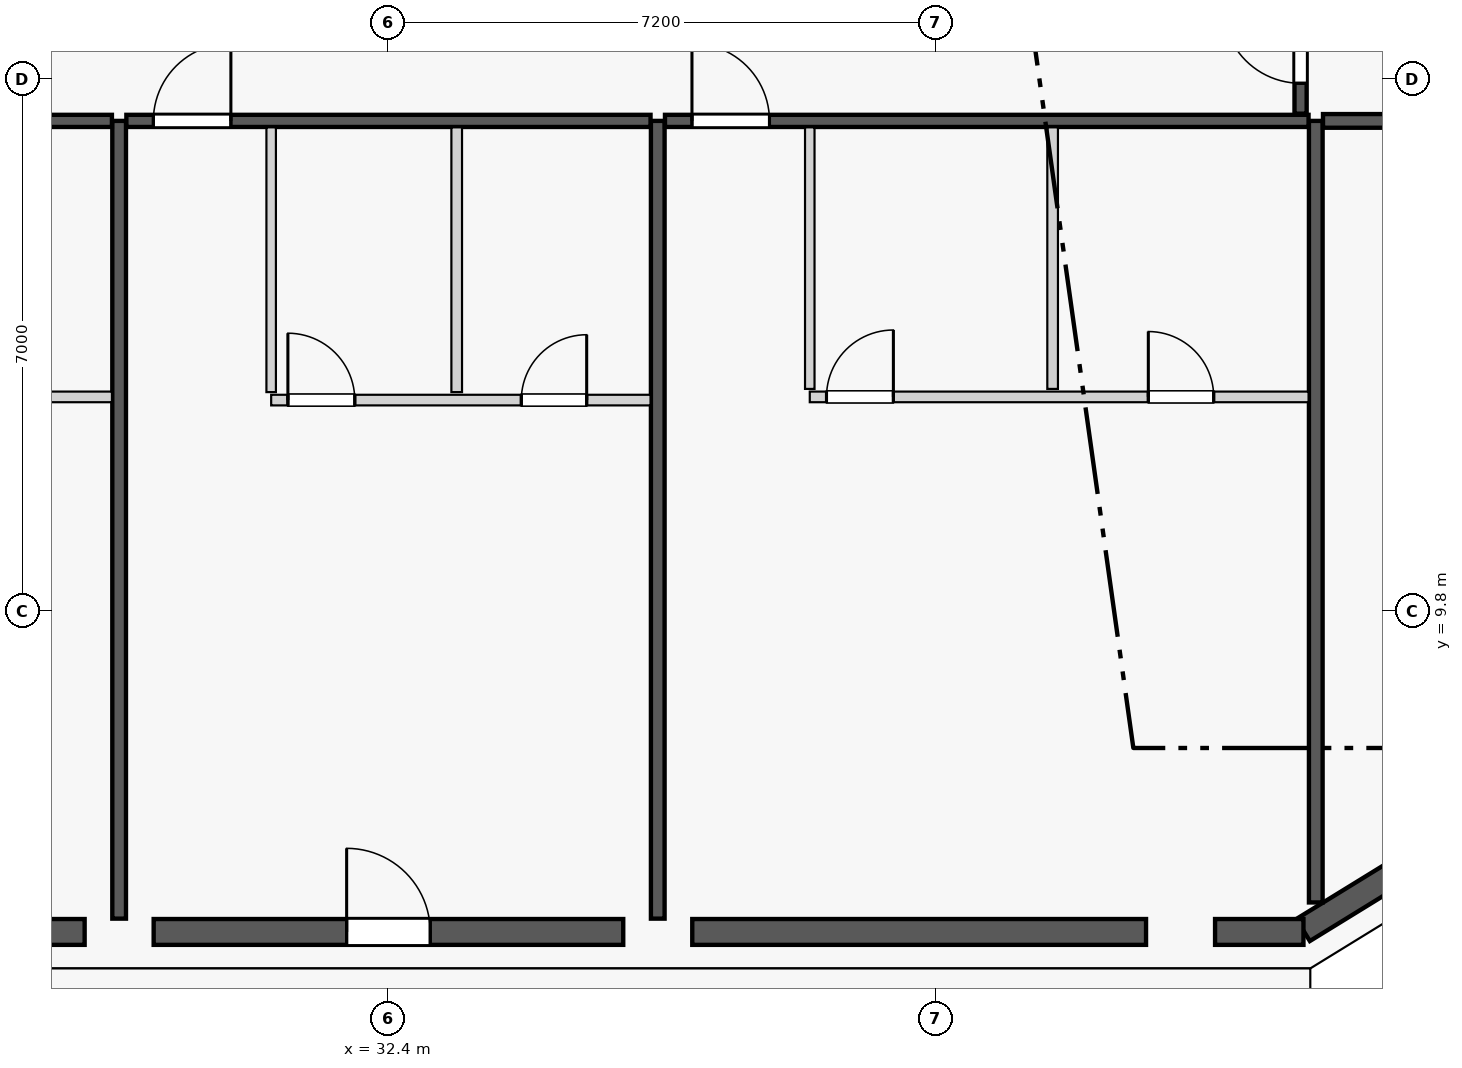
"""IFC4 building model, lengths in metres.
Left out: names, types, materials, properties, quantities, classifications, styles, units other than length and angle.
Written with IfcOpenShell. Run it as: python <this file> out.ifc"""

import sys

from ifc_helpers import new_model, si_unit, direction, frame, frame_2d, origin, origin_2d, place, context, subcontext, project, spatial, rectangle, extrude, element, fill, save


model = new_model("IFC4")
c1 = context("Model", 3, precision=1e-05, world=origin(), true_north=direction((0.0, 1.0)))
c2 = subcontext(c1, "Body", "Model", "MODEL_VIEW")
j1 = project(units=[si_unit("LENGTHUNIT", "METRE"), si_unit("PLANEANGLEUNIT", "RADIAN")], contexts=[c1])
p1 = place(None, origin())
s1 = spatial("IfcSite", under=j1, at=p1, CompositionType="ELEMENT")
p2 = place(p1, origin())
s2 = spatial("IfcBuilding", under=s1, at=p2, CompositionType="ELEMENT")
p3 = place(p2, frame((0.0, 0.0, 186.1)))
s3 = spatial("IfcBuildingStorey", under=s2, at=p3, CompositionType="ELEMENT", Elevation=186.1)
for number, where, z_axis, x_axis in (
    (1, (28.857, 5.642, 0.0), (0.0, 0.0, 1.0), (1.0, 0.0, 0.0)),
    (2, (35.943, 5.642, 0.0), (0.0, 0.0, 1.0), (1.0, 0.0, 0.0)),
    (3, (42.821, 5.589, 0.0), (0.0, 0.0, 1.0), (1.0, 0.0, 0.0)),
):
    element("IfcColumn", number, at=place(p3, frame(where, z_axis=z_axis, x_axis=x_axis)), inside=s3, PredefinedType="COLUMN", context=c2, shape_type="SweptSolid", body=[
        extrude(rectangle(XDim=0.9, YDim=0.9, at=origin_2d()), origin(), (0.0, 0.0, 1.0), 3.55),
    ])
p4 = place(p3, frame((44.658, 6.654, 0.0), z_axis=(0.0, 0.0, 1.0), x_axis=(0.865230187018, 0.501374833306, 0.0)))
e4 = element("IfcColumn", 4, at=p4, inside=s3, PredefinedType="PILASTER", context=c2, shape_type="SweptSolid", body=[
    extrude(rectangle(XDim=0.5, YDim=0.35, at=origin_2d()), origin(), (0.0, 0.0, 1.0), 3.55),
])
p5 = place(p3, frame((44.433, 5.605, 0.0), z_axis=(0.0, 0.0, 1.0), x_axis=(0.851778214877, 0.523902541185, 0.0)))
e5 = element("IfcWall", 5, at=p5, inside=s3, PredefinedType="STANDARD", context=c2, shape_type="SweptSolid", body=[
    extrude(rectangle(XDim=1.678, YDim=0.34, at=frame_2d((0.839, 0.0))), origin(), (0.0, 0.0, 1.0), 3.35),
])
p6 = place(p3, frame((22.433, 5.58, 0.0), z_axis=(0.0, 0.0, 1.0), x_axis=(1.0, 0.0, 0.0)))
e6 = element("IfcWall", 6, at=p6, inside=s3, PredefinedType="STANDARD", context=c2, shape_type="SweptSolid", body=[
    extrude(rectangle(XDim=5.97, YDim=0.34, at=frame_2d((2.985, 0.0))), origin(), (0.0, 0.0, 1.0), 2.883),
])
p7 = place(p6, frame((2.435, 0.0, 0.75)))
e7 = element("IfcOpeningElement", 7, at=p7, cuts=e6, PredefinedType="OPENING", context=c2, shape_type="SweptSolid", body=[
    extrude(rectangle(XDim=1.1, YDim=1.983, at=frame_2d((0.55, 0.991))), frame((0.0, 0.18, 0.0), z_axis=(0.0, -1.0, 0.0), x_axis=(1.0, 0.0, 0.0)), (0.0, 0.0, 1.0), 0.36),
])
p8 = place(p3, frame((29.311, 5.58, 0.0), z_axis=(0.0, 0.0, 1.0), x_axis=(1.0, 0.0, 0.0)))
e8 = element("IfcWall", 8, at=p8, inside=s3, PredefinedType="STANDARD", context=c2, shape_type="SweptSolid", body=[
    extrude(rectangle(XDim=6.178, YDim=0.34, at=frame_2d((3.089, 0.0))), origin(), (0.0, 0.0, 1.0), 2.883),
])
p9 = place(p8, frame((2.539, 0.0, 0.0)))
e9 = element("IfcOpeningElement", 9, at=p9, cuts=e8, PredefinedType="OPENING", context=c2, shape_type="SweptSolid", body=[
    extrude(rectangle(XDim=1.1, YDim=2.25, at=frame_2d((0.55, 1.125))), frame((0.0, 0.18, 0.0), z_axis=(0.0, -1.0, 0.0), x_axis=(1.0, 0.0, 0.0)), (0.0, 0.0, 1.0), 0.36),
])
p10 = place(p3, frame((36.397, 5.58, 0.0), z_axis=(0.0, 0.0, 1.0), x_axis=(1.0, 0.0, 0.0)))
e10 = element("IfcWall", 10, at=p10, inside=s3, PredefinedType="STANDARD", context=c2, shape_type="SweptSolid", body=[
    extrude(rectangle(XDim=5.97, YDim=0.34, at=frame_2d((2.985, 0.0))), origin(), (0.0, 0.0, 1.0), 2.883),
])
p11 = place(p10, frame((2.435, 0.0, 0.75)))
e11 = element("IfcOpeningElement", 11, at=p11, cuts=e10, PredefinedType="OPENING", context=c2, shape_type="SweptSolid", body=[
    extrude(rectangle(XDim=1.1, YDim=1.983, at=frame_2d((0.55, 0.991))), frame((0.0, 0.18, 0.0), z_axis=(0.0, -1.0, 0.0), x_axis=(1.0, 0.0, 0.0)), (0.0, 0.0, 1.0), 0.36),
])
p12 = place(p3, frame((43.275, 5.58, 0.0), z_axis=(0.0, 0.0, 1.0), x_axis=(1.0, 0.0, 0.0)))
e12 = element("IfcWall", 12, at=p12, inside=s3, PredefinedType="STANDARD", context=c2, shape_type="SweptSolid", body=[
    extrude(rectangle(XDim=1.163, YDim=0.34, at=frame_2d((0.582, 0.0))), origin(), (0.0, 0.0, 1.0), 3.35),
])
for number, where, z_axis, x_axis in (
    (13, (28.857, 5.755, 0.0), (0.0, 0.0, 1.0), (0.0, 1.0, 0.0)),
    (14, (35.943, 5.755, 0.0), (0.0, 0.0, 1.0), (0.0, 1.0, 0.0)),
):
    element("IfcWall", number, at=place(p3, frame(where, z_axis=z_axis, x_axis=x_axis)), inside=s3, PredefinedType="PARTITIONING", context=c2, shape_type="SweptSolid", body=[
        extrude(rectangle(XDim=10.495, YDim=0.18, at=frame_2d((5.248, 0.0))), origin(), (0.0, 0.0, 1.0), 2.807),
    ])
p13 = place(p3, frame((44.6, 5.968, 0.0), z_axis=(0.0, 0.0, 1.0), x_axis=(0.0, 1.0, 0.0)))
e15 = element("IfcWall", 15, at=p13, inside=s3, PredefinedType="PARTITIONING", context=c2, shape_type="SweptSolid", body=[
    extrude(rectangle(XDim=10.282, YDim=0.18, at=frame_2d((5.141, 0.0))), origin(), (0.0, 0.0, 1.0), 3.35),
])
p14 = place(p3, frame((20.295, 16.25, 0.0), z_axis=(0.0, 0.0, 1.0), x_axis=(1.0, 0.0, 0.0)))
e16 = element("IfcWall", 16, at=p14, inside=s3, PredefinedType="PARTITIONING", context=c2, shape_type="SweptSolid", body=[
    extrude(rectangle(XDim=8.467, YDim=0.16, at=frame_2d((4.233, 0.0))), origin(), (0.0, 0.0, 1.0), 3.35),
])
p15 = place(p14, frame((0.705, 0.0, 0.0)))
e17 = element("IfcOpeningElement", 17, at=p15, cuts=e16, PredefinedType="OPENING", context=c2, shape_type="SweptSolid", body=[
    extrude(rectangle(XDim=1.02, YDim=2.25, at=frame_2d((0.51, 1.125))), frame((0.0, 0.09, 0.0), z_axis=(0.0, -1.0, 0.0), x_axis=(1.0, 0.0, 0.0)), (0.0, 0.0, 1.0), 0.18),
])
p16 = place(p3, frame((22.55, 12.619, 0.0), z_axis=(0.0, 0.0, 1.0), x_axis=(1.0, 0.0, 0.0)))
e18 = element("IfcWall", 18, at=p16, inside=s3, PredefinedType="PLUMBINGWALL", context=c2, shape_type="SweptSolid", body=[
    extrude(rectangle(XDim=6.212, YDim=0.14, at=frame_2d((3.106, 0.0))), origin(), (0.0, 0.0, 1.0), 3.35),
])
p17 = place(p16, frame((4.195, 0.0, 0.0)))
e19 = element("IfcOpeningElement", 19, at=p17, cuts=e18, PredefinedType="OPENING", context=c2, shape_type="SweptSolid", body=[
    extrude(rectangle(XDim=0.86, YDim=2.1, at=frame_2d((0.43, 1.05))), frame((0.0, 0.08, 0.0), z_axis=(0.0, -1.0, 0.0), x_axis=(1.0, 0.0, 0.0)), (0.0, 0.0, 1.0), 0.16),
])
p18 = place(p16, frame((0.22, 0.0, 0.0)))
e20 = element("IfcOpeningElement", 20, at=p18, cuts=e18, PredefinedType="OPENING", context=c2, shape_type="SweptSolid", body=[
    extrude(rectangle(XDim=0.88, YDim=2.15, at=frame_2d((0.44, 1.075))), frame((0.0, 0.08, 0.0), z_axis=(0.0, -1.0, 0.0), x_axis=(1.0, 0.0, 0.0)), (0.0, 0.0, 1.0), 0.16),
])
p19 = place(p3, frame((28.952, 16.25, 0.0), z_axis=(0.0, 0.0, 1.0), x_axis=(1.0, 0.0, 0.0)))
e21 = element("IfcWall", 21, at=p19, inside=s3, PredefinedType="PARTITIONING", context=c2, shape_type="SweptSolid", body=[
    extrude(rectangle(XDim=6.896, YDim=0.16, at=frame_2d((3.448, 0.0))), origin(), (0.0, 0.0, 1.0), 3.35),
])
p20 = place(p19, frame((0.355, 0.0, 0.0)))
e22 = element("IfcOpeningElement", 22, at=p20, cuts=e21, PredefinedType="OPENING", context=c2, shape_type="SweptSolid", body=[
    extrude(rectangle(XDim=1.02, YDim=2.25, at=frame_2d((0.51, 1.125))), frame((0.0, 0.09, 0.0), z_axis=(0.0, -1.0, 0.0), x_axis=(1.0, 0.0, 0.0)), (0.0, 0.0, 1.0), 0.18),
])
p21 = place(p3, frame((30.857, 12.682, 0.0), z_axis=(0.0, 0.0, 1.0), x_axis=(0.0, 1.0, 0.0)))
e23 = element("IfcWall", 23, at=p21, inside=s3, PredefinedType="PARTITIONING", context=c2, shape_type="SweptSolid", body=[
    extrude(rectangle(XDim=3.483, YDim=0.125, at=frame_2d((1.742, 0.0))), origin(), (0.0, 0.0, 1.0), 3.35),
])
p22 = place(p3, frame((30.857, 12.577, 0.0), z_axis=(0.0, 0.0, 1.0), x_axis=(1.0, 0.0, 0.0)))
e24 = element("IfcWall", 24, at=p22, inside=s3, PredefinedType="PLUMBINGWALL", context=c2, shape_type="SweptSolid", body=[
    extrude(rectangle(XDim=4.991, YDim=0.14, at=frame_2d((2.496, 0.0))), origin(), (0.0, 0.0, 1.0), 3.35),
])
p23 = place(p22, frame((3.291, 0.0, 0.0)))
e25 = element("IfcOpeningElement", 25, at=p23, cuts=e24, PredefinedType="OPENING", context=c2, shape_type="SweptSolid", body=[
    extrude(rectangle(XDim=0.86, YDim=2.1, at=frame_2d((0.43, 1.05))), frame((0.0, 0.08, 0.0), z_axis=(0.0, -1.0, 0.0), x_axis=(1.0, 0.0, 0.0)), (0.0, 0.0, 1.0), 0.16),
])
p24 = place(p22, frame((0.22, 0.0, 0.0)))
e26 = element("IfcOpeningElement", 26, at=p24, cuts=e24, PredefinedType="OPENING", context=c2, shape_type="SweptSolid", body=[
    extrude(rectangle(XDim=0.88, YDim=2.15, at=frame_2d((0.44, 1.075))), frame((0.0, 0.08, 0.0), z_axis=(0.0, -1.0, 0.0), x_axis=(1.0, 0.0, 0.0)), (0.0, 0.0, 1.0), 0.16),
])
p25 = place(p3, frame((33.298, 12.682, 0.0), z_axis=(0.0, 0.0, 1.0), x_axis=(0.0, 1.0, 0.0)))
e27 = element("IfcWall", 27, at=p25, inside=s3, PredefinedType="PLUMBINGWALL", context=c2, shape_type="SweptSolid", body=[
    extrude(rectangle(XDim=3.483, YDim=0.14, at=frame_2d((1.742, 0.0))), origin(), (0.0, 0.0, 1.0), 3.35),
])
p26 = place(p3, frame((36.038, 16.25, 0.0), z_axis=(0.0, 0.0, 1.0), x_axis=(1.0, 0.0, 0.0)))
e28 = element("IfcWall", 28, at=p26, inside=s3, PredefinedType="PARTITIONING", context=c2, shape_type="SweptSolid", body=[
    extrude(rectangle(XDim=8.467, YDim=0.16, at=frame_2d((4.233, 0.0))), origin(), (0.0, 0.0, 1.0), 3.35),
])
p27 = place(p26, frame((0.355, 0.0, 0.0)))
e29 = element("IfcOpeningElement", 29, at=p27, cuts=e28, PredefinedType="OPENING", context=c2, shape_type="SweptSolid", body=[
    extrude(rectangle(XDim=1.02, YDim=2.25, at=frame_2d((0.51, 1.125))), frame((0.0, 0.09, 0.0), z_axis=(0.0, -1.0, 0.0), x_axis=(1.0, 0.0, 0.0)), (0.0, 0.0, 1.0), 0.18),
])
p28 = place(p3, frame((37.943, 12.724, 0.0), z_axis=(0.0, 0.0, 1.0), x_axis=(0.0, 1.0, 0.0)))
e30 = element("IfcWall", 30, at=p28, inside=s3, PredefinedType="PARTITIONING", context=c2, shape_type="SweptSolid", body=[
    extrude(rectangle(XDim=3.441, YDim=0.125, at=frame_2d((1.72, 0.0))), origin(), (0.0, 0.0, 1.0), 3.35),
])
p29 = place(p3, frame((37.943, 12.619, 0.0), z_axis=(0.0, 0.0, 1.0), x_axis=(1.0, 0.0, 0.0)))
e31 = element("IfcWall", 31, at=p29, inside=s3, PredefinedType="PLUMBINGWALL", context=c2, shape_type="SweptSolid", body=[
    extrude(rectangle(XDim=6.562, YDim=0.14, at=frame_2d((3.281, 0.0))), origin(), (0.0, 0.0, 1.0), 3.35),
])
p30 = place(p29, frame((4.454, 0.0, 0.0)))
e32 = element("IfcOpeningElement", 32, at=p30, cuts=e31, PredefinedType="OPENING", context=c2, shape_type="SweptSolid", body=[
    extrude(rectangle(XDim=0.86, YDim=2.1, at=frame_2d((0.43, 1.05))), frame((0.0, 0.08, 0.0), z_axis=(0.0, -1.0, 0.0), x_axis=(1.0, 0.0, 0.0)), (0.0, 0.0, 1.0), 0.16),
])
p31 = place(p29, frame((0.22, 0.0, 0.0)))
e33 = element("IfcOpeningElement", 33, at=p31, cuts=e31, PredefinedType="OPENING", context=c2, shape_type="SweptSolid", body=[
    extrude(rectangle(XDim=0.88, YDim=2.15, at=frame_2d((0.44, 1.075))), frame((0.0, 0.08, 0.0), z_axis=(0.0, -1.0, 0.0), x_axis=(1.0, 0.0, 0.0)), (0.0, 0.0, 1.0), 0.16),
])
p32 = place(p3, frame((41.138, 12.724, 0.0), z_axis=(0.0, 0.0, 1.0), x_axis=(0.0, 1.0, 0.0)))
e34 = element("IfcWall", 34, at=p32, inside=s3, PredefinedType="PLUMBINGWALL", context=c2, shape_type="SweptSolid", body=[
    extrude(rectangle(XDim=3.441, YDim=0.14, at=frame_2d((1.72, 0.0))), origin(), (0.0, 0.0, 1.0), 3.35),
])
p33 = place(p3, frame((44.695, 16.25, 0.0), z_axis=(0.0, 0.0, 1.0), x_axis=(1.0, 0.0, 0.0)))
e35 = element("IfcWall", 35, at=p33, inside=s3, PredefinedType="PARTITIONING", context=c2, shape_type="SweptSolid", body=[
    extrude(rectangle(XDim=5.894, YDim=0.18, at=frame_2d((2.947, 0.0))), origin(), (0.0, 0.0, 1.0), 3.35),
])
p34 = place(p3, frame((44.4, 16.345, 0.0), z_axis=(0.0, 0.0, 1.0), x_axis=(0.0, 1.0, 0.0)))
e36 = element("IfcWall", 36, at=p34, inside=s3, PredefinedType="PARTITIONING", context=c2, shape_type="SweptSolid", body=[
    extrude(rectangle(XDim=6.236, YDim=0.16, at=frame_2d((3.118, 0.0))), origin(), (0.0, 0.0, 1.0), 3.35),
])
p35 = place(p34, frame((0.4, 0.0, 0.0)))
e37 = element("IfcOpeningElement", 37, at=p35, cuts=e36, PredefinedType="OPENING", context=c2, shape_type="SweptSolid", body=[
    extrude(rectangle(XDim=1.02, YDim=2.25, at=frame_2d((0.51, 1.125))), frame((0.0, 0.09, 0.0), z_axis=(0.0, -1.0, 0.0), x_axis=(1.0, 0.0, 0.0)), (0.0, 0.0, 1.0), 0.18),
])
p36 = place(p9, origin())
e38 = element("IfcDoor", 38, at=p36, inside=s3, OperationType="SINGLE_SWING_LEFT", PredefinedType="DOOR", context=c2, shape_type="SweptSolid", body=[
    extrude(rectangle(XDim=1.1, YDim=2.25, at=frame_2d((0.55, 1.125))), frame((0.0, 0.025, 0.0), z_axis=(0.0, -1.0, 0.0), x_axis=(1.0, 0.0, 0.0)), (0.0, 0.0, 1.0), 0.05),
])
fill(e9, e38)
p37 = place(p11, origin())
e39 = element("IfcWindow", 39, at=p37, inside=s3, PartitioningType="SINGLE_PANEL", PredefinedType="WINDOW", context=c2, shape_type="SweptSolid", body=[
    extrude(rectangle(XDim=1.1, YDim=1.983, at=frame_2d((0.55, 0.991))), frame((0.0, 0.03, 0.0), z_axis=(0.0, -1.0, 0.0), x_axis=(1.0, 0.0, 0.0)), (0.0, 0.0, 1.0), 0.06),
])
fill(e11, e39)
p38 = place(p23, origin())
e40 = element("IfcDoor", 40, at=p38, inside=s3, OperationType="SINGLE_SWING_RIGHT", PredefinedType="DOOR", context=c2, shape_type="SweptSolid", body=[
    extrude(rectangle(XDim=0.86, YDim=2.1, at=frame_2d((0.43, 1.05))), frame((0.0, 0.025, 0.0), z_axis=(0.0, -1.0, 0.0), x_axis=(1.0, 0.0, 0.0)), (0.0, 0.0, 1.0), 0.05),
])
fill(e25, e40)
p39 = place(p20, origin())
e41 = element("IfcDoor", 41, at=p39, inside=s3, OperationType="SINGLE_SWING_RIGHT", PredefinedType="DOOR", context=c2, shape_type="SweptSolid", body=[
    extrude(rectangle(XDim=1.02, YDim=2.25, at=frame_2d((0.51, 1.125))), frame((0.0, 0.025, 0.0), z_axis=(0.0, -1.0, 0.0), x_axis=(1.0, 0.0, 0.0)), (0.0, 0.0, 1.0), 0.05),
])
fill(e22, e41)
p40 = place(p24, origin())
e42 = element("IfcDoor", 42, at=p40, inside=s3, OperationType="SINGLE_SWING_LEFT", PredefinedType="DOOR", context=c2, shape_type="SweptSolid", body=[
    extrude(rectangle(XDim=0.88, YDim=2.15, at=frame_2d((0.44, 1.075))), frame((0.0, 0.025, 0.0), z_axis=(0.0, -1.0, 0.0), x_axis=(1.0, 0.0, 0.0)), (0.0, 0.0, 1.0), 0.05),
])
fill(e26, e42)
p41 = place(p30, origin())
e43 = element("IfcDoor", 43, at=p41, inside=s3, OperationType="SINGLE_SWING_LEFT", PredefinedType="DOOR", context=c2, shape_type="SweptSolid", body=[
    extrude(rectangle(XDim=0.86, YDim=2.1, at=frame_2d((0.43, 1.05))), frame((0.0, 0.025, 0.0), z_axis=(0.0, -1.0, 0.0), x_axis=(1.0, 0.0, 0.0)), (0.0, 0.0, 1.0), 0.05),
])
fill(e32, e43)
p42 = place(p27, origin())
e44 = element("IfcDoor", 44, at=p42, inside=s3, OperationType="SINGLE_SWING_LEFT", PredefinedType="DOOR", context=c2, shape_type="SweptSolid", body=[
    extrude(rectangle(XDim=1.02, YDim=2.25, at=frame_2d((0.51, 1.125))), frame((0.0, 0.025, 0.0), z_axis=(0.0, -1.0, 0.0), x_axis=(1.0, 0.0, 0.0)), (0.0, 0.0, 1.0), 0.05),
])
fill(e29, e44)
p43 = place(p31, origin())
e45 = element("IfcDoor", 45, at=p43, inside=s3, OperationType="SINGLE_SWING_RIGHT", PredefinedType="DOOR", context=c2, shape_type="SweptSolid", body=[
    extrude(rectangle(XDim=0.88, YDim=2.15, at=frame_2d((0.44, 1.075))), frame((0.0, 0.025, 0.0), z_axis=(0.0, -1.0, 0.0), x_axis=(1.0, 0.0, 0.0)), (0.0, 0.0, 1.0), 0.05),
])
fill(e33, e45)
p44 = place(p35, origin())
e46 = element("IfcDoor", 46, at=p44, inside=s3, OperationType="SINGLE_SWING_RIGHT", PredefinedType="DOOR", context=c2, shape_type="SweptSolid", body=[
    extrude(rectangle(XDim=1.02, YDim=2.25, at=frame_2d((0.51, 1.125))), frame((0.0, 0.025, 0.0), z_axis=(0.0, -1.0, 0.0), x_axis=(1.0, 0.0, 0.0)), (0.0, 0.0, 1.0), 0.05),
])
fill(e37, e46)
save(model, sys.argv[1])
